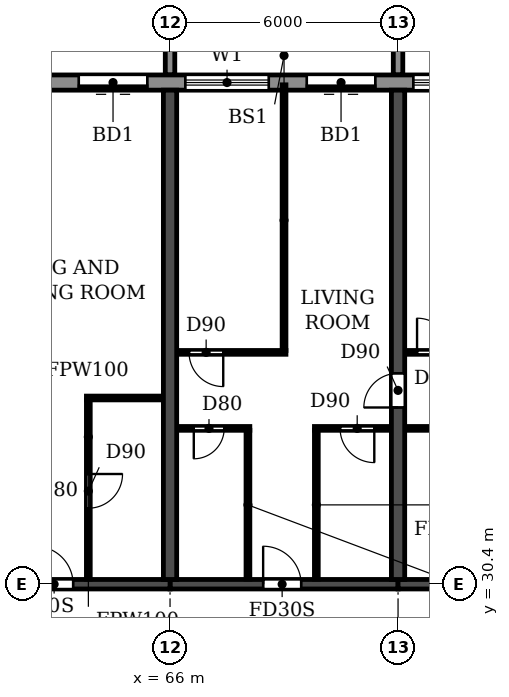
"""IFC4 building model, lengths in metres.
Left out: names, types, materials, properties, quantities, classifications, styles, units other than length and angle.
Written with IfcOpenShell. Run it as: python <this file> out.ifc"""

import sys

from ifc_helpers import new_model, si_unit, direction, frame, frame_2d, origin, place, context, subcontext, project, spatial, polyline, rectangle, outline, extrude, source, transform, mapped, element, fill, save


model = new_model("IFC4")
c1 = context("Model", 3, precision=1e-05, world=origin(), true_north=direction((0.0, 1.0)))
c2 = subcontext(c1, "Body", "Model", "MODEL_VIEW")
j1 = project(units=[si_unit("LENGTHUNIT", "METRE"), si_unit("PLANEANGLEUNIT", "RADIAN")], contexts=[c1])
p1 = place(None, origin())
s1 = spatial("IfcSite", under=j1, at=p1, CompositionType="ELEMENT")
p2 = place(p1, origin())
s2 = spatial("IfcBuilding", under=s1, at=p2, CompositionType="ELEMENT")
p3 = place(p2, frame((0.0, 0.0, 109.2)))
s3 = spatial("IfcBuildingStorey", under=s2, at=p3, CompositionType="ELEMENT", Elevation=109.2)
p4 = place(p3, frame((66.0, 30.525, 0.0), z_axis=(0.0, 0.0, 1.0), x_axis=(0.0, 1.0, 0.0)))
e1 = element("IfcWall", 1, at=p4, inside=s3, PredefinedType="SHEAR", context=c2, shape_type="SweptSolid", body=[
    extrude(rectangle(XDim=12.875, YDim=0.35, at=frame_2d((6.438, 0.0))), origin(), (0.0, 0.0, 1.0), 3.06),
])
p5 = place(p3, frame((72.0, 30.525, 0.0), z_axis=(0.0, 0.0, 1.0), x_axis=(0.0, 1.0, 0.0)))
e2 = element("IfcWall", 2, at=p5, inside=s3, PredefinedType="SHEAR", context=c2, shape_type="SweptSolid", body=[
    extrude(rectangle(XDim=12.875, YDim=0.35, at=frame_2d((6.438, 0.0))), origin(), (0.0, 0.0, 1.0), 3.06),
])
p6 = place(p5, frame((4.525, 0.0, 0.0)))
e3 = element("IfcOpeningElement", 3, at=p6, cuts=e2, PredefinedType="OPENING", context=c2, shape_type="SweptSolid", body=[
    extrude(rectangle(XDim=0.9, YDim=2.1, at=frame_2d((0.45, 1.05))), frame((0.0, 0.185, 0.0), z_axis=(0.0, -1.0, 0.0), x_axis=(1.0, 0.0, 0.0)), (0.0, 0.0, 1.0), 0.37),
])
p7 = place(p3, frame((60.0, 30.4, 0.0), z_axis=(0.0, 0.0, 1.0), x_axis=(1.0, 0.0, 0.0)))
e4 = element("IfcWall", 4, at=p7, inside=s3, PredefinedType="SHEAR", context=c2, shape_type="SweptSolid", body=[
    extrude(rectangle(XDim=6.0, YDim=0.25, at=frame_2d((3.0, 0.0))), origin(), (0.0, 0.0, 1.0), 2.46),
])
p8 = place(p7, frame((2.45, 0.0, 0.0)))
e5 = element("IfcOpeningElement", 5, at=p8, cuts=e4, PredefinedType="OPENING", context=c2, shape_type="SweptSolid", body=[
    extrude(rectangle(XDim=1.0, YDim=2.1, at=frame_2d((0.5, 1.05))), frame((0.0, 0.135, 0.0), z_axis=(0.0, -1.0, 0.0), x_axis=(1.0, 0.0, 0.0)), (0.0, 0.0, 1.0), 0.27),
])
p9 = place(p3, frame((66.0, 30.4, 0.0), z_axis=(0.0, 0.0, 1.0), x_axis=(1.0, 0.0, 0.0)))
e6 = element("IfcWall", 6, at=p9, inside=s3, PredefinedType="SHEAR", context=c2, shape_type="SweptSolid", body=[
    extrude(rectangle(XDim=6.0, YDim=0.25, at=frame_2d((3.0, 0.0))), origin(), (0.0, 0.0, 1.0), 2.46),
])
p10 = place(p9, frame((2.45, 0.0, 0.0)))
e7 = element("IfcOpeningElement", 7, at=p10, cuts=e6, PredefinedType="OPENING", context=c2, shape_type="SweptSolid", body=[
    extrude(rectangle(XDim=1.0, YDim=2.1, at=frame_2d((0.5, 1.05))), frame((0.0, 0.135, 0.0), z_axis=(0.0, -1.0, 0.0), x_axis=(1.0, 0.0, 0.0)), (0.0, 0.0, 1.0), 0.27),
])
p11 = place(p3, frame((72.0, 30.4, 0.0), z_axis=(0.0, 0.0, 1.0), x_axis=(1.0, 0.0, 0.0)))
e8 = element("IfcWall", 8, at=p11, inside=s3, PredefinedType="SHEAR", context=c2, shape_type="SweptSolid", body=[
    extrude(rectangle(XDim=6.0, YDim=0.25, at=frame_2d((3.0, 0.0))), origin(), (0.0, 0.0, 1.0), 2.46),
])
p12 = place(p3, frame((85.317, 43.6, 0.0), z_axis=(0.0, 0.0, 1.0), x_axis=(-1.0, 0.0, 0.0)))
e9 = element("IfcWall", 9, at=p12, inside=s3, PredefinedType="STANDARD", context=c2, shape_type="SweptSolid", body=[
    extrude(rectangle(XDim=68.634, YDim=0.4, at=frame_2d((34.317, 0.0))), origin(), (0.0, 0.0, 1.0), 3.06),
])
p13 = place(p12, frame((64.917, 0.0, 0.0)))
e10 = element("IfcOpeningElement", 10, at=p13, cuts=e9, PredefinedType="OPENING", context=c2, shape_type="SweptSolid", body=[
    extrude(rectangle(XDim=1.8, YDim=2.4, at=frame_2d((0.9, 1.2))), frame((0.0, 0.21, 0.0), z_axis=(0.0, -1.0, 0.0), x_axis=(1.0, 0.0, 0.0)), (0.0, 0.0, 1.0), 0.42),
])
p14 = place(p12, frame((61.717, 0.0, 0.9)))
e11 = element("IfcOpeningElement", 11, at=p14, cuts=e9, PredefinedType="OPENING", context=c2, shape_type="SweptSolid", body=[
    extrude(rectangle(XDim=2.2, YDim=1.5, at=frame_2d((1.1, 0.75))), frame((0.0, 0.21, 0.0), z_axis=(0.0, -1.0, 0.0), x_axis=(1.0, 0.0, 0.0)), (0.0, 0.0, 1.0), 0.42),
])
p15 = place(p12, frame((58.717, 0.0, 0.9)))
e12 = element("IfcOpeningElement", 12, at=p15, cuts=e9, PredefinedType="OPENING", context=c2, shape_type="SweptSolid", body=[
    extrude(rectangle(XDim=2.2, YDim=1.5, at=frame_2d((1.1, 0.75))), frame((0.0, 0.21, 0.0), z_axis=(0.0, -1.0, 0.0), x_axis=(1.0, 0.0, 0.0)), (0.0, 0.0, 1.0), 0.42),
])
p16 = place(p12, frame((55.917, 0.0, 0.0)))
e13 = element("IfcOpeningElement", 13, at=p16, cuts=e9, PredefinedType="OPENING", context=c2, shape_type="SweptSolid", body=[
    extrude(rectangle(XDim=1.8, YDim=2.4, at=frame_2d((0.9, 1.2))), frame((0.0, 0.21, 0.0), z_axis=(0.0, -1.0, 0.0), x_axis=(1.0, 0.0, 0.0)), (0.0, 0.0, 1.0), 0.42),
])
p17 = place(p12, frame((52.917, 0.0, 0.0)))
e14 = element("IfcOpeningElement", 14, at=p17, cuts=e9, PredefinedType="OPENING", context=c2, shape_type="SweptSolid", body=[
    extrude(rectangle(XDim=1.8, YDim=2.4, at=frame_2d((0.9, 1.2))), frame((0.0, 0.21, 0.0), z_axis=(0.0, -1.0, 0.0), x_axis=(1.0, 0.0, 0.0)), (0.0, 0.0, 1.0), 0.42),
])
p18 = place(p12, frame((49.717, 0.0, 0.9)))
e15 = element("IfcOpeningElement", 15, at=p18, cuts=e9, PredefinedType="OPENING", context=c2, shape_type="SweptSolid", body=[
    extrude(rectangle(XDim=2.2, YDim=1.5, at=frame_2d((1.1, 0.75))), frame((0.0, 0.21, 0.0), z_axis=(0.0, -1.0, 0.0), x_axis=(1.0, 0.0, 0.0)), (0.0, 0.0, 1.0), 0.42),
])
p19 = place(p12, frame((46.717, 0.0, 0.9)))
e16 = element("IfcOpeningElement", 16, at=p19, cuts=e9, PredefinedType="OPENING", context=c2, shape_type="SweptSolid", body=[
    extrude(rectangle(XDim=2.2, YDim=1.5, at=frame_2d((1.1, 0.75))), frame((0.0, 0.21, 0.0), z_axis=(0.0, -1.0, 0.0), x_axis=(1.0, 0.0, 0.0)), (0.0, 0.0, 1.0), 0.42),
])
p20 = place(p12, frame((43.917, 0.0, 0.0)))
e17 = element("IfcOpeningElement", 17, at=p20, cuts=e9, PredefinedType="OPENING", context=c2, shape_type="SweptSolid", body=[
    extrude(rectangle(XDim=1.8, YDim=2.4, at=frame_2d((0.9, 1.2))), frame((0.0, 0.21, 0.0), z_axis=(0.0, -1.0, 0.0), x_axis=(1.0, 0.0, 0.0)), (0.0, 0.0, 1.0), 0.42),
])
p21 = place(p12, frame((40.717, 0.0, 0.9)))
e18 = element("IfcOpeningElement", 18, at=p21, cuts=e9, PredefinedType="OPENING", context=c2, shape_type="SweptSolid", body=[
    extrude(rectangle(XDim=2.2, YDim=1.5, at=frame_2d((1.1, 0.75))), frame((0.0, 0.21, 0.0), z_axis=(0.0, -1.0, 0.0), x_axis=(1.0, 0.0, 0.0)), (0.0, 0.0, 1.0), 0.42),
])
p22 = place(p12, frame((37.717, 0.0, 0.9)))
e19 = element("IfcOpeningElement", 19, at=p22, cuts=e9, PredefinedType="OPENING", context=c2, shape_type="SweptSolid", body=[
    extrude(rectangle(XDim=2.2, YDim=1.5, at=frame_2d((1.1, 0.75))), frame((0.0, 0.21, 0.0), z_axis=(0.0, -1.0, 0.0), x_axis=(1.0, 0.0, 0.0)), (0.0, 0.0, 1.0), 0.42),
])
p23 = place(p12, frame((34.917, 0.0, 0.0)))
e20 = element("IfcOpeningElement", 20, at=p23, cuts=e9, PredefinedType="OPENING", context=c2, shape_type="SweptSolid", body=[
    extrude(rectangle(XDim=1.8, YDim=2.4, at=frame_2d((0.9, 1.2))), frame((0.0, 0.21, 0.0), z_axis=(0.0, -1.0, 0.0), x_axis=(1.0, 0.0, 0.0)), (0.0, 0.0, 1.0), 0.42),
])
p24 = place(p12, frame((31.717, 0.0, 0.9)))
e21 = element("IfcOpeningElement", 21, at=p24, cuts=e9, PredefinedType="OPENING", context=c2, shape_type="SweptSolid", body=[
    extrude(rectangle(XDim=2.2, YDim=1.5, at=frame_2d((1.1, 0.75))), frame((0.0, 0.21, 0.0), z_axis=(0.0, -1.0, 0.0), x_axis=(1.0, 0.0, 0.0)), (0.0, 0.0, 1.0), 0.42),
])
p25 = place(p12, frame((28.917, 0.0, 0.0)))
e22 = element("IfcOpeningElement", 22, at=p25, cuts=e9, PredefinedType="OPENING", context=c2, shape_type="SweptSolid", body=[
    extrude(rectangle(XDim=1.8, YDim=2.4, at=frame_2d((0.9, 1.2))), frame((0.0, 0.21, 0.0), z_axis=(0.0, -1.0, 0.0), x_axis=(1.0, 0.0, 0.0)), (0.0, 0.0, 1.0), 0.42),
])
p26 = place(p12, frame((25.717, 0.0, 0.9)))
e23 = element("IfcOpeningElement", 23, at=p26, cuts=e9, PredefinedType="OPENING", context=c2, shape_type="SweptSolid", body=[
    extrude(rectangle(XDim=2.2, YDim=1.5, at=frame_2d((1.1, 0.75))), frame((0.0, 0.21, 0.0), z_axis=(0.0, -1.0, 0.0), x_axis=(1.0, 0.0, 0.0)), (0.0, 0.0, 1.0), 0.42),
])
p27 = place(p12, frame((22.717, 0.0, 0.9)))
e24 = element("IfcOpeningElement", 24, at=p27, cuts=e9, PredefinedType="OPENING", context=c2, shape_type="SweptSolid", body=[
    extrude(rectangle(XDim=2.2, YDim=1.5, at=frame_2d((1.1, 0.75))), frame((0.0, 0.21, 0.0), z_axis=(0.0, -1.0, 0.0), x_axis=(1.0, 0.0, 0.0)), (0.0, 0.0, 1.0), 0.42),
])
p28 = place(p12, frame((19.917, 0.0, 0.0)))
e25 = element("IfcOpeningElement", 25, at=p28, cuts=e9, PredefinedType="OPENING", context=c2, shape_type="SweptSolid", body=[
    extrude(rectangle(XDim=1.8, YDim=2.4, at=frame_2d((0.9, 1.2))), frame((0.0, 0.21, 0.0), z_axis=(0.0, -1.0, 0.0), x_axis=(1.0, 0.0, 0.0)), (0.0, 0.0, 1.0), 0.42),
])
p29 = place(p12, frame((16.717, 0.0, 0.9)))
e26 = element("IfcOpeningElement", 26, at=p29, cuts=e9, PredefinedType="OPENING", context=c2, shape_type="SweptSolid", body=[
    extrude(rectangle(XDim=2.2, YDim=1.5, at=frame_2d((1.1, 0.75))), frame((0.0, 0.21, 0.0), z_axis=(0.0, -1.0, 0.0), x_axis=(1.0, 0.0, 0.0)), (0.0, 0.0, 1.0), 0.42),
])
p30 = place(p12, frame((13.917, 0.0, 0.0)))
e27 = element("IfcOpeningElement", 27, at=p30, cuts=e9, PredefinedType="OPENING", context=c2, shape_type="SweptSolid", body=[
    extrude(rectangle(XDim=1.8, YDim=2.4, at=frame_2d((0.9, 1.2))), frame((0.0, 0.21, 0.0), z_axis=(0.0, -1.0, 0.0), x_axis=(1.0, 0.0, 0.0)), (0.0, 0.0, 1.0), 0.42),
])
p31 = place(p12, frame((10.717, 0.0, 0.9)))
e28 = element("IfcOpeningElement", 28, at=p31, cuts=e9, PredefinedType="OPENING", context=c2, shape_type="SweptSolid", body=[
    extrude(rectangle(XDim=2.2, YDim=1.5, at=frame_2d((1.1, 0.75))), frame((0.0, 0.21, 0.0), z_axis=(0.0, -1.0, 0.0), x_axis=(1.0, 0.0, 0.0)), (0.0, 0.0, 1.0), 0.42),
])
p32 = place(p12, frame((7.717, 0.0, 0.9)))
e29 = element("IfcOpeningElement", 29, at=p32, cuts=e9, PredefinedType="OPENING", context=c2, shape_type="SweptSolid", body=[
    extrude(rectangle(XDim=2.2, YDim=1.5, at=frame_2d((1.1, 0.75))), frame((0.0, 0.21, 0.0), z_axis=(0.0, -1.0, 0.0), x_axis=(1.0, 0.0, 0.0)), (0.0, 0.0, 1.0), 0.42),
])
p33 = place(p12, frame((4.917, 0.0, 0.0)))
e30 = element("IfcOpeningElement", 30, at=p33, cuts=e9, PredefinedType="OPENING", context=c2, shape_type="SweptSolid", body=[
    extrude(rectangle(XDim=1.8, YDim=2.4, at=frame_2d((0.9, 1.2))), frame((0.0, 0.21, 0.0), z_axis=(0.0, -1.0, 0.0), x_axis=(1.0, 0.0, 0.0)), (0.0, 0.0, 1.0), 0.42),
])
p34 = place(p12, frame((1.717, 0.0, 0.9)))
e31 = element("IfcOpeningElement", 31, at=p34, cuts=e9, PredefinedType="OPENING", context=c2, shape_type="SweptSolid", body=[
    extrude(rectangle(XDim=2.2, YDim=1.5, at=frame_2d((1.1, 0.75))), frame((0.0, 0.21, 0.0), z_axis=(0.0, -1.0, 0.0), x_axis=(1.0, 0.0, 0.0)), (0.0, 0.0, 1.0), 0.42),
])
m1 = source(origin(), c2, "Body", "SweptSolid", [
    extrude(outline(polyline([(0.0, 0.0), (0.25, 0.0), (0.25, 3.1), (0.0, 3.1), (0.0, 0.0)])), origin(), (0.0, 0.0, 1.0), 3.1),
])
for number, where in (
    (32, (65.875, 43.8, 0.0)),
    (33, (71.875, 43.8, 0.0)),
):
    element("IfcWall", number, at=place(p3, frame(where)), inside=s3, PredefinedType="STANDARD", context=c2, shape_type="MappedRepresentation", body=[
        mapped(m1, transform((0.0, 0.0, 0.0))),
    ])
p35 = place(p3, frame((66.185, 34.5, 0.0), z_axis=(0.0, 0.0, 1.0), x_axis=(1.0, 0.0, 0.0)))
e34 = element("IfcWall", 34, at=p35, inside=s3, PredefinedType="PARTITIONING", context=c2, shape_type="SweptSolid", body=[
    extrude(rectangle(XDim=1.915, YDim=0.1, at=frame_2d((0.958, 0.0))), origin(), (0.0, 0.0, 1.0), 3.06),
])
p36 = place(p35, frame((0.44, 0.0, 0.0)))
e35 = element("IfcOpeningElement", 35, at=p36, cuts=e34, PredefinedType="OPENING", context=c2, shape_type="SweptSolid", body=[
    extrude(rectangle(XDim=0.8, YDim=2.1, at=frame_2d((0.4, 1.05))), frame((0.0, 0.06, 0.0), z_axis=(0.0, -1.0, 0.0), x_axis=(1.0, 0.0, 0.0)), (0.0, 0.0, 1.0), 0.12),
])
p37 = place(p3, frame((69.8, 34.5, 0.0), z_axis=(0.0, 0.0, 1.0), x_axis=(1.0, 0.0, 0.0)))
e36 = element("IfcWall", 36, at=p37, inside=s3, PredefinedType="PARTITIONING", context=c2, shape_type="SweptSolid", body=[
    extrude(rectangle(XDim=2.015, YDim=0.1, at=frame_2d((1.007, 0.0))), origin(), (0.0, 0.0, 1.0), 3.06),
])
p38 = place(p37, frame((0.675, 0.0, 0.0)))
e37 = element("IfcOpeningElement", 37, at=p38, cuts=e36, PredefinedType="OPENING", context=c2, shape_type="SweptSolid", body=[
    extrude(rectangle(XDim=0.9, YDim=2.1, at=frame_2d((0.45, 1.05))), frame((0.0, 0.06, 0.0), z_axis=(0.0, -1.0, 0.0), x_axis=(1.0, 0.0, 0.0)), (0.0, 0.0, 1.0), 0.12),
])
p39 = place(p3, frame((72.185, 34.5, 0.0), z_axis=(0.0, 0.0, 1.0), x_axis=(1.0, 0.0, 0.0)))
e38 = element("IfcWall", 38, at=p39, inside=s3, PredefinedType="PARTITIONING", context=c2, shape_type="SweptSolid", body=[
    extrude(rectangle(XDim=5.63, YDim=0.1, at=frame_2d((2.815, 0.0))), origin(), (0.0, 0.0, 1.0), 3.06),
])
p40 = place(p39, frame((1.065, 0.0, 0.0)))
e39 = element("IfcOpeningElement", 39, at=p40, cuts=e38, PredefinedType="OPENING", context=c2, shape_type="SweptSolid", body=[
    extrude(rectangle(XDim=0.8, YDim=2.1, at=frame_2d((0.4, 1.05))), frame((0.0, 0.06, 0.0), z_axis=(0.0, -1.0, 0.0), x_axis=(1.0, 0.0, 0.0)), (0.0, 0.0, 1.0), 0.12),
])
p41 = place(p39, frame((4.065, 0.0, 0.0)))
e40 = element("IfcOpeningElement", 40, at=p41, cuts=e38, PredefinedType="OPENING", context=c2, shape_type="SweptSolid", body=[
    extrude(rectangle(XDim=0.8, YDim=2.1, at=frame_2d((0.4, 1.05))), frame((0.0, 0.06, 0.0), z_axis=(0.0, -1.0, 0.0), x_axis=(1.0, 0.0, 0.0)), (0.0, 0.0, 1.0), 0.12),
])
p42 = place(p3, frame((63.8, 35.3, 0.0), z_axis=(0.0, 0.0, 1.0), x_axis=(1.0, 0.0, 0.0)))
e41 = element("IfcWall", 41, at=p42, inside=s3, PredefinedType="PARTITIONING", context=c2, shape_type="SweptSolid", body=[
    extrude(rectangle(XDim=2.015, YDim=0.1, at=frame_2d((1.007, 0.0))), origin(), (0.0, 0.0, 1.0), 3.06),
])
p43 = place(p3, frame((66.185, 36.5, 0.0), z_axis=(0.0, 0.0, 1.0), x_axis=(1.0, 0.0, 0.0)))
e42 = element("IfcWall", 42, at=p43, inside=s3, PredefinedType="PARTITIONING", context=c2, shape_type="SweptSolid", body=[
    extrude(rectangle(XDim=2.865, YDim=0.1, at=frame_2d((1.433, 0.0))), origin(), (0.0, 0.0, 1.0), 3.06),
])
p44 = place(p43, frame((0.315, 0.0, 0.0)))
e43 = element("IfcOpeningElement", 43, at=p44, cuts=e42, PredefinedType="OPENING", context=c2, shape_type="SweptSolid", body=[
    extrude(rectangle(XDim=0.9, YDim=2.1, at=frame_2d((0.45, 1.05))), frame((0.0, 0.06, 0.0), z_axis=(0.0, -1.0, 0.0), x_axis=(1.0, 0.0, 0.0)), (0.0, 0.0, 1.0), 0.12),
])
p45 = place(p3, frame((72.185, 36.5, 0.0), z_axis=(0.0, 0.0, 1.0), x_axis=(1.0, 0.0, 0.0)))
e44 = element("IfcWall", 44, at=p45, inside=s3, PredefinedType="PARTITIONING", context=c2, shape_type="SweptSolid", body=[
    extrude(rectangle(XDim=5.63, YDim=0.1, at=frame_2d((2.815, 0.0))), origin(), (0.0, 0.0, 1.0), 3.06),
])
p46 = place(p45, frame((0.315, 0.0, 0.0)))
e45 = element("IfcOpeningElement", 45, at=p46, cuts=e44, PredefinedType="OPENING", context=c2, shape_type="SweptSolid", body=[
    extrude(rectangle(XDim=0.9, YDim=2.1, at=frame_2d((0.45, 1.05))), frame((0.0, 0.06, 0.0), z_axis=(0.0, -1.0, 0.0), x_axis=(1.0, 0.0, 0.0)), (0.0, 0.0, 1.0), 0.12),
])
p47 = place(p45, frame((4.415, 0.0, 0.0)))
e46 = element("IfcOpeningElement", 46, at=p47, cuts=e44, PredefinedType="OPENING", context=c2, shape_type="SweptSolid", body=[
    extrude(rectangle(XDim=0.9, YDim=2.1, at=frame_2d((0.45, 1.05))), frame((0.0, 0.06, 0.0), z_axis=(0.0, -1.0, 0.0), x_axis=(1.0, 0.0, 0.0)), (0.0, 0.0, 1.0), 0.12),
])
p48 = place(p3, frame((63.85, 30.535, 0.0), z_axis=(0.0, 0.0, 1.0), x_axis=(0.0, 1.0, 0.0)))
e47 = element("IfcWall", 47, at=p48, inside=s3, PredefinedType="PARTITIONING", context=c2, shape_type="SweptSolid", body=[
    extrude(rectangle(XDim=4.715, YDim=0.1, at=frame_2d((2.357, 0.0))), origin(), (0.0, 0.0, 1.0), 3.06),
])
p49 = place(p48, frame((1.865, 0.0, 0.0)))
e48 = element("IfcOpeningElement", 48, at=p49, cuts=e47, PredefinedType="OPENING", context=c2, shape_type="SweptSolid", body=[
    extrude(rectangle(XDim=0.9, YDim=2.1, at=frame_2d((0.45, 1.05))), frame((0.0, 0.06, 0.0), z_axis=(0.0, -1.0, 0.0), x_axis=(1.0, 0.0, 0.0)), (0.0, 0.0, 1.0), 0.12),
])
p50 = place(p3, frame((68.05, 30.535, 0.0), z_axis=(0.0, 0.0, 1.0), x_axis=(0.0, 1.0, 0.0)))
e49 = element("IfcWall", 49, at=p50, inside=s3, PredefinedType="PARTITIONING", context=c2, shape_type="SweptSolid", body=[
    extrude(rectangle(XDim=3.915, YDim=0.1, at=frame_2d((1.958, 0.0))), origin(), (0.0, 0.0, 1.0), 3.06),
])
p51 = place(p3, frame((69.0, 36.55, 0.0), z_axis=(0.0, 0.0, 1.0), x_axis=(0.0, 1.0, 0.0)))
e50 = element("IfcWall", 50, at=p51, inside=s3, PredefinedType="PARTITIONING", context=c2, shape_type="SweptSolid", body=[
    extrude(rectangle(XDim=6.99, YDim=0.1, at=frame_2d((3.495, 0.0))), origin(), (0.0, 0.0, 1.0), 3.06),
])
p52 = place(p3, frame((69.85, 30.535, 0.0), z_axis=(0.0, 0.0, 1.0), x_axis=(0.0, 1.0, 0.0)))
e51 = element("IfcWall", 51, at=p52, inside=s3, PredefinedType="PARTITIONING", context=c2, shape_type="SweptSolid", body=[
    extrude(rectangle(XDim=3.915, YDim=0.1, at=frame_2d((1.958, 0.0))), origin(), (0.0, 0.0, 1.0), 3.06),
])
p53 = place(p28, origin())
e52 = element("IfcDoor", 52, at=p53, inside=s3, OperationType="DOUBLE_DOOR_SLIDING", PredefinedType="DOOR", context=c2, shape_type="SweptSolid", body=[
    extrude(rectangle(XDim=1.8, YDim=2.4, at=frame_2d((0.9, 1.2))), frame((0.0, 0.025, 0.0), z_axis=(0.0, -1.0, 0.0), x_axis=(1.0, 0.0, 0.0)), (0.0, 0.0, 1.0), 0.05),
])
fill(e25, e52)
p54 = place(p29, origin())
e53 = element("IfcWindow", 53, at=p54, inside=s3, PartitioningType="DOUBLE_PANEL_HORIZONTAL", PredefinedType="WINDOW", context=c2, shape_type="SweptSolid", body=[
    extrude(rectangle(XDim=2.2, YDim=1.5, at=frame_2d((1.1, 0.75))), frame((0.0, 0.03, 0.0), z_axis=(0.0, -1.0, 0.0), x_axis=(1.0, 0.0, 0.0)), (0.0, 0.0, 1.0), 0.06),
])
fill(e26, e53)
p55 = place(p30, origin())
e54 = element("IfcDoor", 54, at=p55, inside=s3, OperationType="DOUBLE_DOOR_SLIDING", PredefinedType="DOOR", context=c2, shape_type="SweptSolid", body=[
    extrude(rectangle(XDim=1.8, YDim=2.4, at=frame_2d((0.9, 1.2))), frame((0.0, 0.025, 0.0), z_axis=(0.0, -1.0, 0.0), x_axis=(1.0, 0.0, 0.0)), (0.0, 0.0, 1.0), 0.05),
])
fill(e27, e54)
p56 = place(p31, origin())
e55 = element("IfcWindow", 55, at=p56, inside=s3, PartitioningType="DOUBLE_PANEL_HORIZONTAL", PredefinedType="WINDOW", context=c2, shape_type="SweptSolid", body=[
    extrude(rectangle(XDim=2.2, YDim=1.5, at=frame_2d((1.1, 0.75))), frame((0.0, 0.03, 0.0), z_axis=(0.0, -1.0, 0.0), x_axis=(1.0, 0.0, 0.0)), (0.0, 0.0, 1.0), 0.06),
])
fill(e28, e55)
p57 = place(p8, origin())
e56 = element("IfcDoor", 56, at=p57, inside=s3, OperationType="SINGLE_SWING_LEFT", PredefinedType="DOOR", context=c2, shape_type="SweptSolid", body=[
    extrude(rectangle(XDim=1.0, YDim=2.1, at=frame_2d((0.5, 1.05))), frame((0.0, 0.025, 0.0), z_axis=(0.0, -1.0, 0.0), x_axis=(1.0, 0.0, 0.0)), (0.0, 0.0, 1.0), 0.05),
])
fill(e5, e56)
p58 = place(p49, frame((0.9, 0.0, 0.0), z_axis=(0.0, 0.0, 1.0), x_axis=(-1.0, 0.0, 0.0)))
e57 = element("IfcDoor", 57, at=p58, inside=s3, OperationType="SINGLE_SWING_LEFT", PredefinedType="DOOR", context=c2, shape_type="SweptSolid", body=[
    extrude(rectangle(XDim=0.9, YDim=2.1, at=frame_2d((0.45, 1.05))), frame((0.0, 0.025, 0.0), z_axis=(0.0, -1.0, 0.0), x_axis=(1.0, 0.0, 0.0)), (0.0, 0.0, 1.0), 0.05),
])
fill(e48, e57)
p59 = place(p46, origin())
e58 = element("IfcDoor", 58, at=p59, inside=s3, OperationType="SINGLE_SWING_LEFT", PredefinedType="DOOR", context=c2, shape_type="SweptSolid", body=[
    extrude(rectangle(XDim=0.9, YDim=2.1, at=frame_2d((0.45, 1.05))), frame((0.0, 0.025, 0.0), z_axis=(0.0, -1.0, 0.0), x_axis=(1.0, 0.0, 0.0)), (0.0, 0.0, 1.0), 0.05),
])
fill(e45, e58)
p60 = place(p44, frame((0.9, 0.0, 0.0), z_axis=(0.0, 0.0, 1.0), x_axis=(-1.0, 0.0, 0.0)))
e59 = element("IfcDoor", 59, at=p60, inside=s3, OperationType="SINGLE_SWING_LEFT", PredefinedType="DOOR", context=c2, shape_type="SweptSolid", body=[
    extrude(rectangle(XDim=0.9, YDim=2.1, at=frame_2d((0.45, 1.05))), frame((0.0, 0.025, 0.0), z_axis=(0.0, -1.0, 0.0), x_axis=(1.0, 0.0, 0.0)), (0.0, 0.0, 1.0), 0.05),
])
fill(e43, e59)
p61 = place(p36, frame((0.8, 0.0, 0.0), z_axis=(0.0, 0.0, 1.0), x_axis=(-1.0, 0.0, 0.0)))
e60 = element("IfcDoor", 60, at=p61, inside=s3, OperationType="SINGLE_SWING_RIGHT", PredefinedType="DOOR", context=c2, shape_type="SweptSolid", body=[
    extrude(rectangle(XDim=0.8, YDim=2.1, at=frame_2d((0.4, 1.05))), frame((0.0, 0.025, 0.0), z_axis=(0.0, -1.0, 0.0), x_axis=(1.0, 0.0, 0.0)), (0.0, 0.0, 1.0), 0.05),
])
fill(e35, e60)
p62 = place(p10, origin())
e61 = element("IfcDoor", 61, at=p62, inside=s3, OperationType="SINGLE_SWING_LEFT", PredefinedType="DOOR", context=c2, shape_type="SweptSolid", body=[
    extrude(rectangle(XDim=1.0, YDim=2.1, at=frame_2d((0.5, 1.05))), frame((0.0, 0.025, 0.0), z_axis=(0.0, -1.0, 0.0), x_axis=(1.0, 0.0, 0.0)), (0.0, 0.0, 1.0), 0.05),
])
fill(e7, e61)
p63 = place(p38, frame((0.9, 0.0, 0.0), z_axis=(0.0, 0.0, 1.0), x_axis=(-1.0, 0.0, 0.0)))
e62 = element("IfcDoor", 62, at=p63, inside=s3, OperationType="SINGLE_SWING_LEFT", PredefinedType="DOOR", context=c2, shape_type="SweptSolid", body=[
    extrude(rectangle(XDim=0.9, YDim=2.1, at=frame_2d((0.45, 1.05))), frame((0.0, 0.025, 0.0), z_axis=(0.0, -1.0, 0.0), x_axis=(1.0, 0.0, 0.0)), (0.0, 0.0, 1.0), 0.05),
])
fill(e37, e62)
p64 = place(p6, origin())
e63 = element("IfcDoor", 63, at=p64, inside=s3, OperationType="SINGLE_SWING_LEFT", PredefinedType="DOOR", context=c2, shape_type="SweptSolid", body=[
    extrude(rectangle(XDim=0.9, YDim=2.1, at=frame_2d((0.45, 1.05))), frame((0.0, 0.025, 0.0), z_axis=(0.0, -1.0, 0.0), x_axis=(1.0, 0.0, 0.0)), (0.0, 0.0, 1.0), 0.05),
])
fill(e3, e63)
save(model, sys.argv[1])
